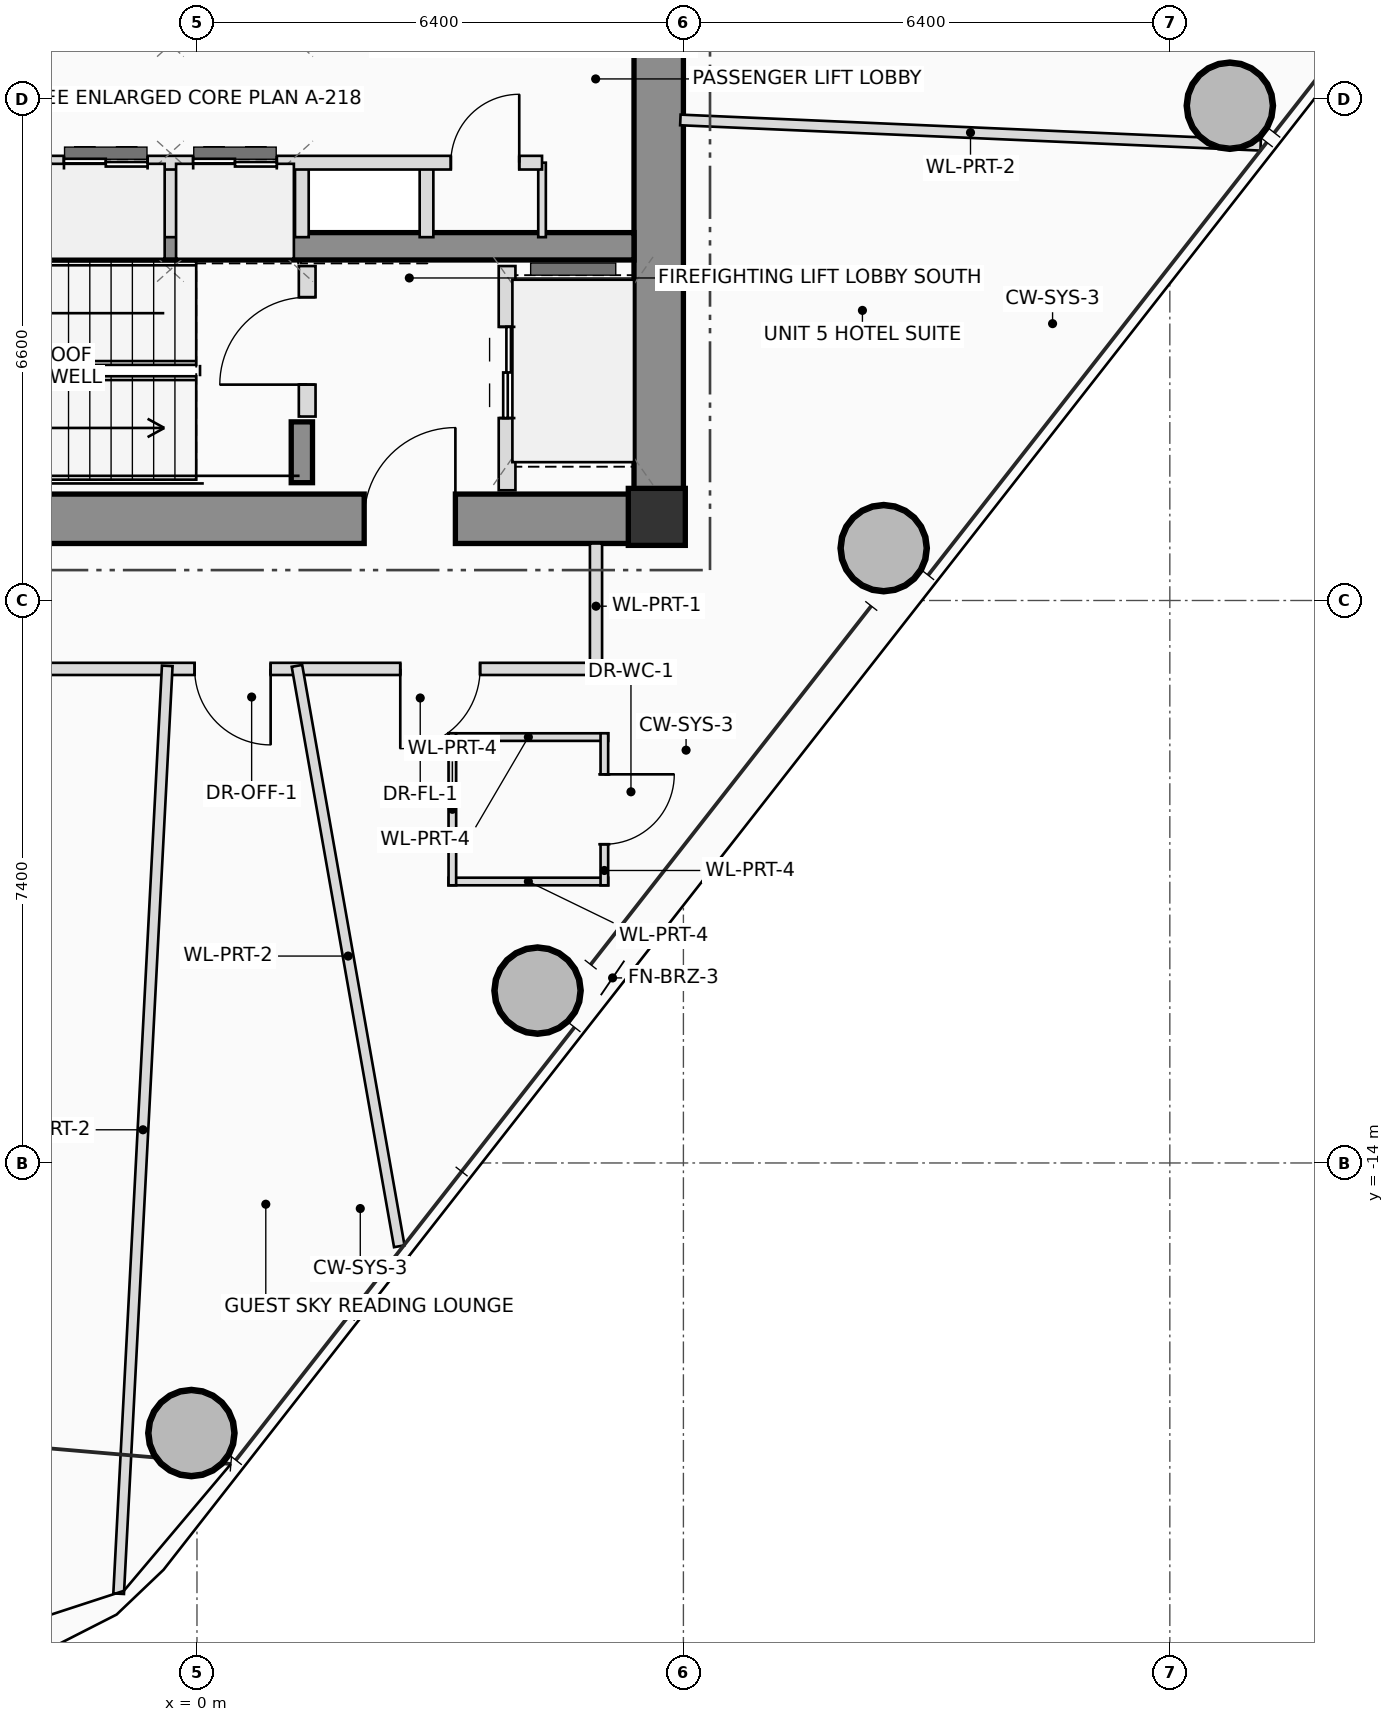
"""IFC4 building model, lengths in metres.
Left out: names, types, materials, properties, quantities, classifications, styles, units other than length and angle.
Written with IfcOpenShell. Run it as: python <this file> out.ifc"""

import sys

from ifc_helpers import new_model, si_unit, direction, frame, frame_2d, origin, origin_2d, place, context, subcontext, project, spatial, rectangle, hollow_circle, extrude, source, transform, mapped, element, fill, save


model = new_model("IFC4")
c1 = context("Model", 3, precision=1e-05, world=origin(), true_north=direction((0.0, 1.0)))
c2 = subcontext(c1, "Body", "Model", "MODEL_VIEW")
j1 = project(units=[si_unit("LENGTHUNIT", "METRE"), si_unit("PLANEANGLEUNIT", "RADIAN")], contexts=[c1])
p1 = place(None, origin())
s1 = spatial("IfcSite", under=j1, at=p1, CompositionType="ELEMENT")
p2 = place(p1, origin())
s2 = spatial("IfcBuilding", under=s1, at=p2, CompositionType="ELEMENT")
p3 = place(p2, frame((0.0, 0.0, 198.35)))
s3 = spatial("IfcBuildingStorey", under=s2, at=p3, CompositionType="ELEMENT", Elevation=198.35)
m1 = source(origin(), c2, "Body", "SweptSolid", [
    extrude(rectangle(XDim=0.75, YDim=0.75, at=origin_2d()), origin(), (0.0, 0.0, 1.0), 3.45),
])
p4 = place(p3, frame((6.05, -5.5, 0.0), z_axis=(0.0, 0.0, 1.0), x_axis=(1.0, 0.0, 0.0)))
e1 = element("IfcColumn", 1, at=p4, inside=s3, PredefinedType="COLUMN", context=c2, shape_type="MappedRepresentation", body=[
    mapped(m1, transform((0.0, 0.0, 0.0), scale=1.0)),
])
p5 = place(p3, frame((-6.4, -5.525, 0.0), z_axis=(0.0, 0.0, 1.0), x_axis=(1.0, 0.0, 0.0)))
e2 = element("IfcWall", 2, at=p5, inside=s3, PredefinedType="SHEAR", context=c2, shape_type="SweptSolid", body=[
    extrude(rectangle(XDim=12.8, YDim=0.65, at=frame_2d((6.4, 0.0))), origin(), (0.0, 0.0, 1.0), 3.45),
])
p6 = place(p5, frame((8.6, 0.0, 0.0)))
e3 = element("IfcOpeningElement", 3, at=p6, cuts=e2, PredefinedType="OPENING", context=c2, shape_type="SweptSolid", body=[
    extrude(rectangle(XDim=1.2, YDim=2.2, at=frame_2d((0.6, 1.1))), frame((0.0, 0.335, 0.0), z_axis=(0.0, -1.0, 0.0), x_axis=(1.0, 0.0, 0.0)), (0.0, 0.0, 1.0), 0.67),
])
p7 = place(p3, frame((6.075, -5.2, 0.0), z_axis=(0.0, 0.0, 1.0), x_axis=(0.0, 1.0, 0.0)))
e4 = element("IfcWall", 4, at=p7, inside=s3, PredefinedType="SHEAR", context=c2, shape_type="SweptSolid", body=[
    extrude(rectangle(XDim=10.4, YDim=0.65, at=frame_2d((5.2, 0.0))), origin(), (0.0, 0.0, 1.0), 3.45),
])
p8 = place(p3, frame((-5.75, -1.94, 0.0), z_axis=(0.0, 0.0, 1.0), x_axis=(1.0, 0.0, 0.0)))
e5 = element("IfcWall", 5, at=p8, inside=s3, PredefinedType="SHEAR", context=c2, shape_type="SweptSolid", body=[
    extrude(rectangle(XDim=11.5, YDim=0.36, at=frame_2d((5.75, 0.0))), origin(), (0.0, 0.0, 1.0), 3.45),
])
p9 = place(p3, frame((1.38, -5.05, 0.0), z_axis=(0.0, 0.0, 1.0), x_axis=(0.0, 1.0, 0.0)))
e6 = element("IfcWall", 6, at=p9, inside=s3, PredefinedType="SHEAR", context=c2, shape_type="SweptSolid", body=[
    extrude(rectangle(XDim=0.8, YDim=0.28, at=frame_2d((0.4, 0.0))), origin(), (0.0, 0.0, 1.0), 3.45),
])
m2 = source(origin(), c2, "Body", "SweptSolid", [
    extrude(hollow_circle(Radius=0.575, WallThickness=0.042, at=origin_2d()), origin(), (0.0, 0.0, 1.0), 3.45),
])
for number, where, z_axis, x_axis in (
    (7, (-0.073, -17.553, 0.0), (0.0, 0.0, 1.0), (1.0, 0.0, 0.0)),
    (8, (4.481, -11.732, 0.0), (0.0, 0.0, 1.0), (1.0, 0.0, 0.0)),
    (9, (9.035, -5.911, 0.0), (0.0, 0.0, 1.0), (1.0, 0.0, 0.0)),
    (10, (13.59, -0.09, 0.0), (0.0, 0.0, 1.0), (1.0, 0.0, 0.0)),
):
    element("IfcColumn", number, at=place(p3, frame(where, z_axis=z_axis, x_axis=x_axis)), inside=s3, PredefinedType="COLUMN", context=c2, shape_type="MappedRepresentation", body=[
        mapped(m2, transform((0.0, 0.0, 0.0), scale=1.0)),
    ])
p10 = place(p3, frame((1.45, -4.18, 0.0), z_axis=(0.0, 0.0, 1.0), x_axis=(0.0, 1.0, 0.0)))
e11 = element("IfcWall", 11, at=p10, inside=s3, PredefinedType="PLUMBINGWALL", context=c2, shape_type="SweptSolid", body=[
    extrude(rectangle(XDim=1.98, YDim=0.22, at=frame_2d((0.99, 0.0))), origin(), (0.0, 0.0, 1.0), 3.25),
])
p11 = place(p10, frame((0.42, 0.0, 0.0)))
e12 = element("IfcOpeningElement", 12, at=p11, cuts=e11, PredefinedType="OPENING", context=c2, shape_type="SweptSolid", body=[
    extrude(rectangle(XDim=1.15, YDim=2.15, at=frame_2d((0.575, 1.075))), frame((0.0, 0.12, 0.0), z_axis=(0.0, -1.0, 0.0), x_axis=(1.0, 0.0, 0.0)), (0.0, 0.0, 1.0), 0.24),
])
p12 = place(p3, frame((4.08, -5.15, 0.0), z_axis=(0.0, 0.0, 1.0), x_axis=(0.0, 1.0, 0.0)))
e13 = element("IfcWall", 13, at=p12, inside=s3, PredefinedType="PLUMBINGWALL", context=c2, shape_type="SweptSolid", body=[
    extrude(rectangle(XDim=2.95, YDim=0.22, at=frame_2d((1.475, 0.0))), origin(), (0.0, 0.0, 1.0), 3.25),
])
p13 = place(p12, frame((0.95, 0.0, 0.0)))
e14 = element("IfcOpeningElement", 14, at=p13, cuts=e13, PredefinedType="OPENING", context=c2, shape_type="SweptSolid", body=[
    extrude(rectangle(XDim=1.2, YDim=2.25, at=frame_2d((0.6, 1.125))), frame((0.0, 0.12, 0.0), z_axis=(0.0, -1.0, 0.0), x_axis=(1.0, 0.0, 0.0)), (0.0, 0.0, 1.0), 0.24),
])
for number, where, z_axis, x_axis in (
    (15, (-0.35, -1.82, 0.0), (0.0, 0.0, 1.0), (0.0, 1.0, 0.0)),
    (16, (1.38, -1.82, 0.0), (0.0, 0.0, 1.0), (0.0, 1.0, 0.0)),
    (17, (3.02, -1.82, 0.0), (0.0, 0.0, 1.0), (0.0, 1.0, 0.0)),
):
    element("IfcWall", number, at=place(p3, frame(where, z_axis=z_axis, x_axis=x_axis)), inside=s3, PredefinedType="PLUMBINGWALL", context=c2, shape_type="SweptSolid", body=[
        extrude(rectangle(XDim=0.98, YDim=0.18, at=frame_2d((0.49, 0.0))), origin(), (0.0, 0.0, 1.0), 3.25),
    ])
p14 = place(p3, frame((4.54, -1.82, 0.0), z_axis=(0.0, 0.0, 1.0), x_axis=(0.0, 1.0, 0.0)))
e18 = element("IfcWall", 18, at=p14, inside=s3, PredefinedType="PARTITIONING", context=c2, shape_type="SweptSolid", body=[
    extrude(rectangle(XDim=0.98, YDim=0.1, at=frame_2d((0.49, 0.0))), origin(), (0.0, 0.0, 1.0), 3.25),
])
p15 = place(p3, frame((-5.68, -0.84, 0.0), z_axis=(0.0, 0.0, 1.0), x_axis=(1.0, 0.0, 0.0)))
e19 = element("IfcWall", 19, at=p15, inside=s3, PredefinedType="PLUMBINGWALL", context=c2, shape_type="SweptSolid", body=[
    extrude(rectangle(XDim=10.22, YDim=0.18, at=frame_2d((5.11, 0.0))), origin(), (0.0, 0.0, 1.0), 3.25),
])
p16 = place(p15, frame((1.38, 0.0, 0.0)))
e20 = element("IfcOpeningElement", 20, at=p16, cuts=e19, PredefinedType="OPENING", context=c2, shape_type="SweptSolid", body=[
    extrude(rectangle(XDim=0.9, YDim=2.05, at=frame_2d((0.45, 1.025))), frame((0.0, 0.1, 0.0), z_axis=(0.0, -1.0, 0.0), x_axis=(1.0, 0.0, 0.0)), (0.0, 0.0, 1.0), 0.2),
])
p17 = place(p15, frame((3.93, 0.0, 0.0)))
e21 = element("IfcOpeningElement", 21, at=p17, cuts=e19, PredefinedType="OPENING", context=c2, shape_type="SweptSolid", body=[
    extrude(rectangle(XDim=1.1, YDim=2.2, at=frame_2d((0.55, 1.1))), frame((0.0, 0.1, 0.0), z_axis=(0.0, -1.0, 0.0), x_axis=(1.0, 0.0, 0.0)), (0.0, 0.0, 1.0), 0.2),
])
p18 = place(p15, frame((5.63, 0.0, 0.0)))
e22 = element("IfcOpeningElement", 22, at=p18, cuts=e19, PredefinedType="OPENING", context=c2, shape_type="SweptSolid", body=[
    extrude(rectangle(XDim=1.1, YDim=2.2, at=frame_2d((0.55, 1.1))), frame((0.0, 0.1, 0.0), z_axis=(0.0, -1.0, 0.0), x_axis=(1.0, 0.0, 0.0)), (0.0, 0.0, 1.0), 0.2),
])
p19 = place(p15, frame((9.02, 0.0, 0.0)))
e23 = element("IfcOpeningElement", 23, at=p19, cuts=e19, PredefinedType="OPENING", context=c2, shape_type="SweptSolid", body=[
    extrude(rectangle(XDim=0.9, YDim=2.05, at=frame_2d((0.45, 1.025))), frame((0.0, 0.1, 0.0), z_axis=(0.0, -1.0, 0.0), x_axis=(1.0, 0.0, 0.0)), (0.0, 0.0, 1.0), 0.2),
])
for number, where, z_axis, x_axis in (
    (24, (3.31, -8.397, 0.0), (0.0, 0.0, 1.0), (1.0, 0.0, 0.0)),
    (25, (5.41, -10.297, 0.0), (0.0, 0.0, 1.0), (-1.0, 0.0, 0.0)),
):
    element("IfcWall", number, at=place(p3, frame(where, z_axis=z_axis, x_axis=x_axis)), inside=s3, PredefinedType="PARTITIONING", context=c2, shape_type="SweptSolid", body=[
        extrude(rectangle(XDim=2.1, YDim=0.1, at=frame_2d((1.05, 0.0))), origin(), (0.0, 0.0, 1.0), 2.605),
    ])
p20 = place(p3, frame((5.36, -8.347, 0.0), z_axis=(0.0, 0.0, 1.0), x_axis=(0.0, -1.0, 0.0)))
e26 = element("IfcWall", 26, at=p20, inside=s3, PredefinedType="PARTITIONING", context=c2, shape_type="SweptSolid", body=[
    extrude(rectangle(XDim=2.0, YDim=0.1, at=frame_2d((1.0, 0.0))), origin(), (0.0, 0.0, 1.0), 2.605),
])
p21 = place(p20, frame((0.54, 0.0, 0.0)))
e27 = element("IfcOpeningElement", 27, at=p21, cuts=e26, PredefinedType="OPENING", context=c2, shape_type="SweptSolid", body=[
    extrude(rectangle(XDim=0.92, YDim=2.1, at=frame_2d((0.46, 1.05))), frame((0.0, 0.06, 0.0), z_axis=(0.0, -1.0, 0.0), x_axis=(1.0, 0.0, 0.0)), (0.0, 0.0, 1.0), 0.12),
])
p22 = place(p3, frame((3.36, -10.347, 0.0), z_axis=(0.0, 0.0, 1.0), x_axis=(0.0, 1.0, 0.0)))
e28 = element("IfcWall", 28, at=p22, inside=s3, PredefinedType="PARTITIONING", context=c2, shape_type="SweptSolid", body=[
    extrude(rectangle(XDim=2.0, YDim=0.1, at=frame_2d((1.0, 0.0))), origin(), (0.0, 0.0, 1.0), 2.805),
])
p23 = place(p3, frame((5.25, -5.85, 0.0), z_axis=(0.0, 0.0, 1.0), x_axis=(0.0, -1.0, 0.0)))
e29 = element("IfcWall", 29, at=p23, inside=s3, PredefinedType="PARTITIONING", context=c2, shape_type="SweptSolid", body=[
    extrude(rectangle(XDim=1.65, YDim=0.16, at=frame_2d((0.825, 0.0))), origin(), (0.0, 0.0, 1.0), 3.25),
])
p24 = place(p3, frame((5.25, -7.5, 0.0), z_axis=(0.0, 0.0, 1.0), x_axis=(-1.0, 0.0, 0.0)))
e30 = element("IfcWall", 30, at=p24, inside=s3, PredefinedType="PARTITIONING", context=c2, shape_type="SweptSolid", body=[
    extrude(rectangle(XDim=11.61, YDim=0.16, at=frame_2d((5.805, 0.0))), origin(), (0.0, 0.0, 1.0), 2.605),
])
p25 = place(p24, frame((1.525, 0.0, 0.0)))
e31 = element("IfcOpeningElement", 31, at=p25, cuts=e30, PredefinedType="OPENING", context=c2, shape_type="SweptSolid", body=[
    extrude(rectangle(XDim=1.05, YDim=2.2, at=frame_2d((0.525, 1.1))), frame((0.0, 0.09, 0.0), z_axis=(0.0, -1.0, 0.0), x_axis=(1.0, 0.0, 0.0)), (0.0, 0.0, 1.0), 0.18),
])
p26 = place(p24, frame((4.281, 0.0, 0.0)))
e32 = element("IfcOpeningElement", 32, at=p26, cuts=e30, PredefinedType="OPENING", context=c2, shape_type="SweptSolid", body=[
    extrude(rectangle(XDim=1.0, YDim=2.25, at=frame_2d((0.5, 1.125))), frame((0.0, 0.09, 0.0), z_axis=(0.0, -1.0, 0.0), x_axis=(1.0, 0.0, 0.0)), (0.0, 0.0, 1.0), 0.18),
])
p27 = place(p24, frame((7.409, 0.0, 0.0)))
e33 = element("IfcOpeningElement", 33, at=p27, cuts=e30, PredefinedType="OPENING", context=c2, shape_type="SweptSolid", body=[
    extrude(rectangle(XDim=1.0, YDim=2.25, at=frame_2d((0.5, 1.125))), frame((0.0, 0.09, 0.0), z_axis=(0.0, -1.0, 0.0), x_axis=(1.0, 0.0, 0.0)), (0.0, 0.0, 1.0), 0.18),
])
p28 = place(p3, frame((6.36, -0.278, 0.0), z_axis=(0.0, 0.0, 1.0), x_axis=(0.999047276506, -0.04364102778, 0.0)))
e34 = element("IfcWall", 34, at=p28, inside=s3, PredefinedType="PARTITIONING", context=c2, shape_type="SweptSolid", body=[
    extrude(rectangle(XDim=7.642, YDim=0.14, at=frame_2d((3.821, 0.0))), origin(), (0.0, 0.0, 1.0), 2.605),
])
p29 = place(p3, frame((-0.391, -7.46, 0.0), z_axis=(0.0, 0.0, 1.0), x_axis=(-0.052329252614, -0.998629886054, 0.0)))
e35 = element("IfcWall", 35, at=p29, inside=s3, PredefinedType="PARTITIONING", context=c2, shape_type="SweptSolid", body=[
    extrude(rectangle(XDim=12.224, YDim=0.14, at=frame_2d((6.112, 0.0))), origin(), (0.0, 0.0, 1.0), 2.605),
])
p30 = place(p3, frame((1.315, -7.46, 0.0), z_axis=(0.0, 0.0, 1.0), x_axis=(0.173654204409, -0.984806690316, 0.0)))
e36 = element("IfcWall", 36, at=p30, inside=s3, PredefinedType="PARTITIONING", context=c2, shape_type="SweptSolid", body=[
    extrude(rectangle(XDim=7.754, YDim=0.14, at=frame_2d((3.877, 0.0))), origin(), (0.0, 0.0, 1.0), 2.765),
])
p31 = place(p6, origin())
e37 = element("IfcDoor", 37, at=p31, inside=s3, OperationType="SINGLE_SWING_RIGHT", PredefinedType="DOOR", context=c2, shape_type="SweptSolid", body=[
    extrude(rectangle(XDim=1.2, YDim=2.2, at=frame_2d((0.6, 1.1))), frame((0.0, 0.025, 0.0), z_axis=(0.0, -1.0, 0.0), x_axis=(1.0, 0.0, 0.0)), (0.0, 0.0, 1.0), 0.05),
])
fill(e3, e37)
p32 = place(p11, origin())
e38 = element("IfcDoor", 38, at=p32, inside=s3, OperationType="SINGLE_SWING_LEFT", PredefinedType="DOOR", context=c2, shape_type="SweptSolid", body=[
    extrude(rectangle(XDim=1.15, YDim=2.15, at=frame_2d((0.575, 1.075))), frame((0.0, 0.025, 0.0), z_axis=(0.0, -1.0, 0.0), x_axis=(1.0, 0.0, 0.0)), (0.0, 0.0, 1.0), 0.05),
])
fill(e12, e38)
p33 = place(p13, origin())
e39 = element("IfcDoor", 39, at=p33, inside=s3, OperationType="DOUBLE_DOOR_SLIDING", PredefinedType="DOOR", context=c2, shape_type="SweptSolid", body=[
    extrude(rectangle(XDim=1.2, YDim=2.25, at=frame_2d((0.6, 1.125))), frame((0.0, 0.025, 0.0), z_axis=(0.0, -1.0, 0.0), x_axis=(1.0, 0.0, 0.0)), (0.0, 0.0, 1.0), 0.05),
])
fill(e14, e39)
p34 = place(p17, origin())
e40 = element("IfcDoor", 40, at=p34, inside=s3, OperationType="DOUBLE_DOOR_SLIDING", PredefinedType="DOOR", context=c2, shape_type="SweptSolid", body=[
    extrude(rectangle(XDim=1.1, YDim=2.2, at=frame_2d((0.55, 1.1))), frame((0.0, 0.025, 0.0), z_axis=(0.0, -1.0, 0.0), x_axis=(1.0, 0.0, 0.0)), (0.0, 0.0, 1.0), 0.05),
])
fill(e21, e40)
p35 = place(p18, origin())
e41 = element("IfcDoor", 41, at=p35, inside=s3, OperationType="DOUBLE_DOOR_SLIDING", PredefinedType="DOOR", context=c2, shape_type="SweptSolid", body=[
    extrude(rectangle(XDim=1.1, YDim=2.2, at=frame_2d((0.55, 1.1))), frame((0.0, 0.025, 0.0), z_axis=(0.0, -1.0, 0.0), x_axis=(1.0, 0.0, 0.0)), (0.0, 0.0, 1.0), 0.05),
])
fill(e22, e41)
p36 = place(p19, origin())
e42 = element("IfcDoor", 42, at=p36, inside=s3, OperationType="SINGLE_SWING_RIGHT", PredefinedType="DOOR", context=c2, shape_type="SweptSolid", body=[
    extrude(rectangle(XDim=0.9, YDim=2.05, at=frame_2d((0.45, 1.025))), frame((0.0, 0.025, 0.0), z_axis=(0.0, -1.0, 0.0), x_axis=(1.0, 0.0, 0.0)), (0.0, 0.0, 1.0), 0.05),
])
fill(e23, e42)
p37 = place(p21, origin())
e43 = element("IfcDoor", 43, at=p37, inside=s3, OperationType="SINGLE_SWING_LEFT", PredefinedType="DOOR", context=c2, shape_type="SweptSolid", body=[
    extrude(rectangle(XDim=0.92, YDim=2.1, at=frame_2d((0.46, 1.05))), frame((0.0, 0.025, 0.0), z_axis=(0.0, -1.0, 0.0), x_axis=(1.0, 0.0, 0.0)), (0.0, 0.0, 1.0), 0.05),
])
fill(e27, e43)
p38 = place(p25, origin())
e44 = element("IfcDoor", 44, at=p38, inside=s3, OperationType="SINGLE_SWING_RIGHT", PredefinedType="DOOR", context=c2, shape_type="SweptSolid", body=[
    extrude(rectangle(XDim=1.05, YDim=2.2, at=frame_2d((0.525, 1.1))), frame((0.0, 0.025, 0.0), z_axis=(0.0, -1.0, 0.0), x_axis=(1.0, 0.0, 0.0)), (0.0, 0.0, 1.0), 0.05),
])
fill(e31, e44)
p39 = place(p26, origin())
e45 = element("IfcDoor", 45, at=p39, inside=s3, OperationType="SINGLE_SWING_LEFT", PredefinedType="DOOR", context=c2, shape_type="SweptSolid", body=[
    extrude(rectangle(XDim=1.0, YDim=2.25, at=frame_2d((0.5, 1.125))), frame((0.0, 0.025, 0.0), z_axis=(0.0, -1.0, 0.0), x_axis=(1.0, 0.0, 0.0)), (0.0, 0.0, 1.0), 0.05),
])
fill(e32, e45)
save(model, sys.argv[1])
